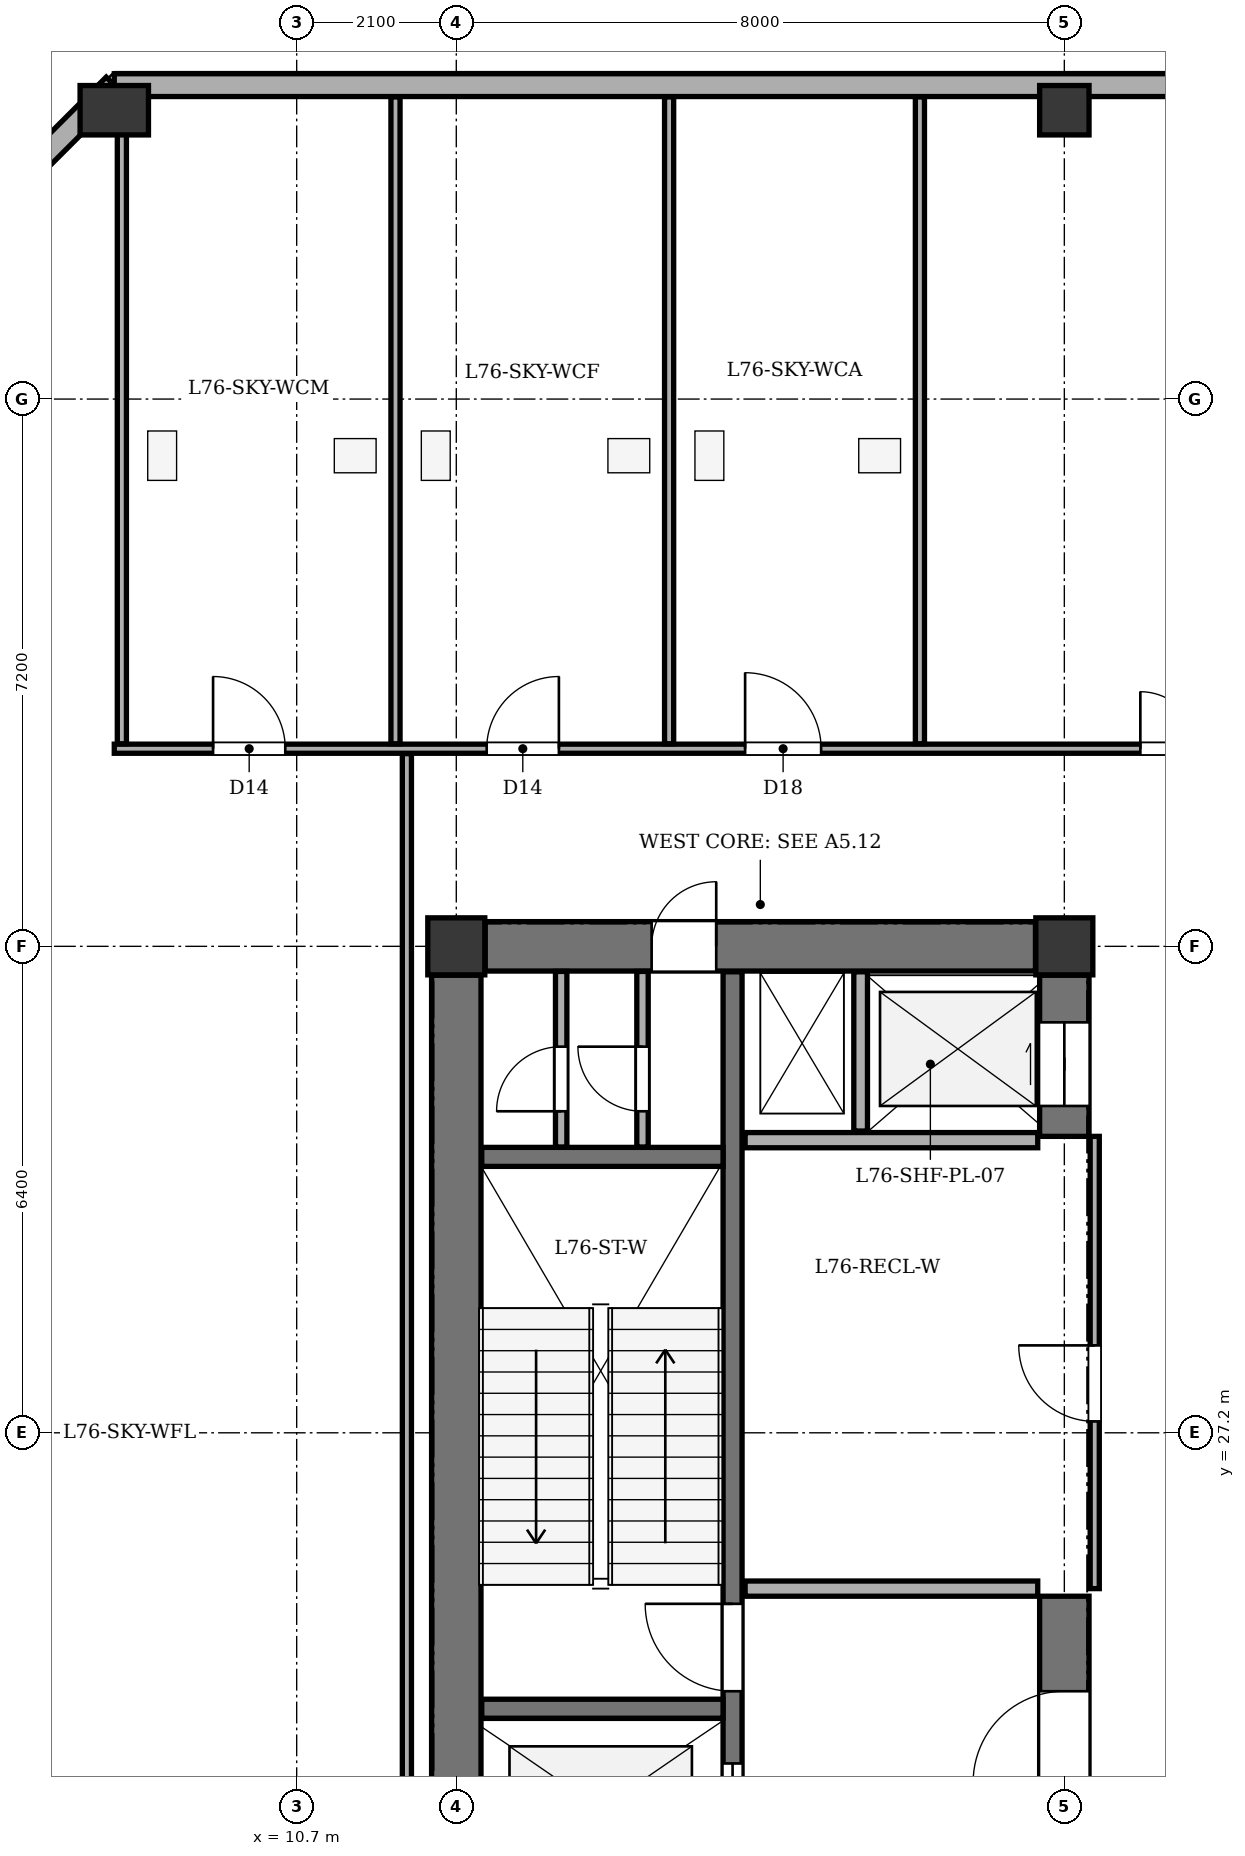
"""IFC4 building model, lengths in metres.
Left out: names, types, materials, properties, quantities, classifications, styles, units other than length and angle.
Written with IfcOpenShell. Run it as: python <this file> out.ifc"""

import sys

from ifc_helpers import new_model, si_unit, direction, frame, frame_2d, origin, origin_2d, place, context, subcontext, project, spatial, rectangle, extrude, element, fill, save


model = new_model("IFC4")
c1 = context("Model", 3, precision=1e-05, world=origin(), true_north=direction((0.0, 1.0)))
c2 = subcontext(c1, "Body", "Model", "MODEL_VIEW")
j1 = project(units=[si_unit("LENGTHUNIT", "METRE"), si_unit("PLANEANGLEUNIT", "RADIAN")], contexts=[c1])
p1 = place(None, origin())
s1 = spatial("IfcSite", under=j1, at=p1, CompositionType="ELEMENT")
p2 = place(p1, origin())
s2 = spatial("IfcBuilding", under=s1, at=p2, CompositionType="ELEMENT")
p3 = place(p2, frame((0.0, 0.0, 287.4)))
s3 = spatial("IfcBuildingStorey", under=s2, at=p3, CompositionType="ELEMENT", Elevation=287.4)
for number, where, z_axis, x_axis in (
    (1, (12.8, 33.6, 0.0), (0.0, 0.0, 1.0), (1.0, 0.0, 0.0)),
    (2, (20.8, 33.6, 0.0), (0.0, 0.0, 1.0), (1.0, 0.0, 0.0)),
):
    element("IfcColumn", number, at=place(p3, frame(where, z_axis=z_axis, x_axis=x_axis)), inside=s3, PredefinedType="COLUMN", context=c2, shape_type="SweptSolid", body=[
        extrude(rectangle(XDim=0.75, YDim=0.75, at=origin_2d()), origin(), (0.0, 0.0, 1.0), 4.8),
    ])
p4 = place(p3, frame((8.3, 44.6, 0.0), z_axis=(0.0, 0.0, 1.0), x_axis=(1.0, 0.0, 0.0)))
e3 = element("IfcColumn", 3, at=p4, inside=s3, PredefinedType="COLUMN", context=c2, shape_type="SweptSolid", body=[
    extrude(rectangle(XDim=0.65, YDim=0.9, at=origin_2d()), origin(), (0.0, 0.0, 1.0), 4.8),
])
p5 = place(p3, frame((20.8, 44.6, 0.0), z_axis=(0.0, 0.0, 1.0), x_axis=(1.0, 0.0, 0.0)))
e4 = element("IfcColumn", 4, at=p5, inside=s3, PredefinedType="COLUMN", context=c2, shape_type="SweptSolid", body=[
    extrude(rectangle(XDim=0.65, YDim=0.65, at=origin_2d()), origin(), (0.0, 0.0, 1.0), 4.8),
])
p6 = place(p3, frame((4.47, 41.1, 0.0), z_axis=(0.0, 0.0, 1.0), x_axis=(0.707129318095, 0.707084243559, 0.0)))
e5 = element("IfcWall", 5, at=p6, inside=s3, PredefinedType="STANDARD", context=c2, shape_type="SweptSolid", body=[
    extrude(rectangle(XDim=5.416, YDim=0.3, at=frame_2d((2.708, 0.0))), origin(), (0.0, 0.0, 1.0), 3.735),
])
p7 = place(p3, frame((8.3, 44.93, 0.0), z_axis=(0.0, 0.0, 1.0), x_axis=(1.0, 0.0, 0.0)))
e6 = element("IfcWall", 6, at=p7, inside=s3, PredefinedType="STANDARD", context=c2, shape_type="SweptSolid", body=[
    extrude(rectangle(XDim=37.0, YDim=0.3, at=frame_2d((18.5, 0.0))), origin(), (0.0, 0.0, 1.0), 3.735),
])
p8 = place(p3, frame((12.8, 21.18, 0.0), z_axis=(0.0, 0.0, 1.0), x_axis=(0.0, 1.0, 0.0)))
e7 = element("IfcWall", 7, at=p8, inside=s3, PredefinedType="SHEAR", context=c2, shape_type="SweptSolid", body=[
    extrude(rectangle(XDim=12.04, YDim=0.65, at=frame_2d((6.02, 0.0))), origin(), (0.0, 0.0, 1.0), 4.35),
])
p9 = place(p3, frame((13.18, 33.6, 0.0), z_axis=(0.0, 0.0, 1.0), x_axis=(1.0, 0.0, 0.0)))
e8 = element("IfcWall", 8, at=p9, inside=s3, PredefinedType="SHEAR", context=c2, shape_type="SweptSolid", body=[
    extrude(rectangle(XDim=7.24, YDim=0.65, at=frame_2d((3.62, 0.0))), origin(), (0.0, 0.0, 1.0), 4.35),
])
p10 = place(p9, frame((2.19, 0.0, 0.0)))
e9 = element("IfcOpeningElement", 9, at=p10, cuts=e8, PredefinedType="OPENING", context=c2, shape_type="SweptSolid", body=[
    extrude(rectangle(XDim=0.85, YDim=2.02, at=frame_2d((0.425, 1.01))), frame((0.0, 0.335, 0.0), z_axis=(0.0, -1.0, 0.0), x_axis=(1.0, 0.0, 0.0)), (0.0, 0.0, 1.0), 0.67),
])
p11 = place(p3, frame((20.8, 21.18, 0.0), z_axis=(0.0, 0.0, 1.0), x_axis=(0.0, 1.0, 0.0)))
e10 = element("IfcWall", 10, at=p11, inside=s3, PredefinedType="SHEAR", context=c2, shape_type="SweptSolid", body=[
    extrude(rectangle(XDim=3.87, YDim=0.65, at=frame_2d((1.935, 0.0))), origin(), (0.0, 0.0, 1.0), 4.35),
])
p12 = place(p11, frame((1.42, 0.0, 0.0)))
e11 = element("IfcOpeningElement", 11, at=p12, cuts=e10, PredefinedType="OPENING", context=c2, shape_type="SweptSolid", body=[
    extrude(rectangle(XDim=1.2, YDim=2.15, at=frame_2d((0.6, 1.075))), frame((0.0, 0.335, 0.0), z_axis=(0.0, -1.0, 0.0), x_axis=(1.0, 0.0, 0.0)), (0.0, 0.0, 1.0), 0.67),
])
p13 = place(p3, frame((20.8, 31.1, 0.0), z_axis=(0.0, 0.0, 1.0), x_axis=(0.0, 1.0, 0.0)))
e12 = element("IfcWall", 12, at=p13, inside=s3, PredefinedType="SHEAR", context=c2, shape_type="SweptSolid", body=[
    extrude(rectangle(XDim=2.12, YDim=0.65, at=frame_2d((1.06, 0.0))), origin(), (0.0, 0.0, 1.0), 4.35),
])
p14 = place(p13, frame((0.4, 0.0, 0.0)))
e13 = element("IfcOpeningElement", 13, at=p14, cuts=e12, PredefinedType="OPENING", context=c2, shape_type="SweptSolid", body=[
    extrude(rectangle(XDim=1.1, YDim=2.1, at=frame_2d((0.55, 1.05))), frame((0.0, 0.335, 0.0), z_axis=(0.0, -1.0, 0.0), x_axis=(1.0, 0.0, 0.0)), (0.0, 0.0, 1.0), 0.67),
])
p15 = place(p3, frame((16.435, 21.135, 0.0), z_axis=(0.0, 0.0, 1.0), x_axis=(0.0, 1.0, 0.0)))
e14 = element("IfcWall", 14, at=p15, inside=s3, PredefinedType="SHEAR", context=c2, shape_type="SweptSolid", body=[
    extrude(rectangle(XDim=12.13, YDim=0.25, at=frame_2d((6.065, 0.0))), origin(), (0.0, 0.0, 1.0), 4.35),
])
p16 = place(p15, frame((0.515, 0.0, 0.0)))
e15 = element("IfcOpeningElement", 15, at=p16, cuts=e14, PredefinedType="OPENING", context=c2, shape_type="SweptSolid", body=[
    extrude(rectangle(XDim=1.2, YDim=2.15, at=frame_2d((0.6, 1.075))), frame((0.0, 0.135, 0.0), z_axis=(0.0, -1.0, 0.0), x_axis=(1.0, 0.0, 0.0)), (0.0, 0.0, 1.0), 0.27),
])
p17 = place(p15, frame((2.665, 0.0, 0.0)))
e16 = element("IfcOpeningElement", 16, at=p17, cuts=e14, PredefinedType="OPENING", context=c2, shape_type="SweptSolid", body=[
    extrude(rectangle(XDim=1.15, YDim=2.15, at=frame_2d((0.575, 1.075))), frame((0.0, 0.135, 0.0), z_axis=(0.0, -1.0, 0.0), x_axis=(1.0, 0.0, 0.0)), (0.0, 0.0, 1.0), 0.27),
])
for number, where, z_axis, x_axis in (
    (17, (13.135, 23.57, 0.0), (0.0, 0.0, 1.0), (1.0, 0.0, 0.0)),
    (18, (13.135, 30.83, 0.0), (0.0, 0.0, 1.0), (1.0, 0.0, 0.0)),
):
    element("IfcWall", number, at=place(p3, frame(where, z_axis=z_axis, x_axis=x_axis)), inside=s3, PredefinedType="SHEAR", context=c2, shape_type="SweptSolid", body=[
        extrude(rectangle(XDim=3.175, YDim=0.25, at=frame_2d((1.587, 0.0))), origin(), (0.0, 0.0, 1.0), 4.35),
    ])
for number, where, z_axis, x_axis in (
    (19, (16.6, 25.15, 0.0), (0.0, 0.0, 1.0), (1.0, 0.0, 0.0)),
    (20, (16.6, 31.05, 0.0), (0.0, 0.0, 1.0), (1.0, 0.0, 0.0)),
):
    element("IfcWall", number, at=place(p3, frame(where, z_axis=z_axis, x_axis=x_axis)), inside=s3, PredefinedType="SOLIDWALL", context=c2, shape_type="SweptSolid", body=[
        extrude(rectangle(XDim=3.85, YDim=0.2, at=frame_2d((1.925, 0.0))), origin(), (0.0, 0.0, 1.0), 4.35),
    ])
p18 = place(p3, frame((18.12, 31.17, 0.0), z_axis=(0.0, 0.0, 1.0), x_axis=(0.0, 1.0, 0.0)))
e21 = element("IfcWall", 21, at=p18, inside=s3, PredefinedType="PARTITIONING", context=c2, shape_type="SweptSolid", body=[
    extrude(rectangle(XDim=2.095, YDim=0.18, at=frame_2d((1.047, 0.0))), origin(), (0.0, 0.0, 1.0), 4.35),
])
p19 = place(p3, frame((14.18, 30.96, 0.0), z_axis=(0.0, 0.0, 1.0), x_axis=(0.0, 1.0, 0.0)))
e22 = element("IfcWall", 22, at=p19, inside=s3, PredefinedType="PARTITIONING", context=c2, shape_type="SweptSolid", body=[
    extrude(rectangle(XDim=2.31, YDim=0.15, at=frame_2d((1.155, 0.0))), origin(), (0.0, 0.0, 1.0), 4.35),
])
p20 = place(p19, frame((0.47, 0.0, 0.0)))
e23 = element("IfcOpeningElement", 23, at=p20, cuts=e22, PredefinedType="OPENING", context=c2, shape_type="SweptSolid", body=[
    extrude(rectangle(XDim=0.85, YDim=2.02, at=frame_2d((0.425, 1.01))), frame((0.0, 0.085, 0.0), z_axis=(0.0, -1.0, 0.0), x_axis=(1.0, 0.0, 0.0)), (0.0, 0.0, 1.0), 0.17),
])
p21 = place(p3, frame((15.25, 30.96, 0.0), z_axis=(0.0, 0.0, 1.0), x_axis=(0.0, 1.0, 0.0)))
e24 = element("IfcWall", 24, at=p21, inside=s3, PredefinedType="PARTITIONING", context=c2, shape_type="SweptSolid", body=[
    extrude(rectangle(XDim=2.31, YDim=0.15, at=frame_2d((1.155, 0.0))), origin(), (0.0, 0.0, 1.0), 4.35),
])
p22 = place(p21, frame((0.47, 0.0, 0.0)))
e25 = element("IfcOpeningElement", 25, at=p22, cuts=e24, PredefinedType="OPENING", context=c2, shape_type="SweptSolid", body=[
    extrude(rectangle(XDim=0.85, YDim=2.02, at=frame_2d((0.425, 1.01))), frame((0.0, 0.085, 0.0), z_axis=(0.0, -1.0, 0.0), x_axis=(1.0, 0.0, 0.0)), (0.0, 0.0, 1.0), 0.17),
])
p23 = place(p3, frame((21.2, 25.15, 0.0), z_axis=(0.0, 0.0, 1.0), x_axis=(0.0, 1.0, 0.0)))
e26 = element("IfcWall", 26, at=p23, inside=s3, PredefinedType="PARTITIONING", context=c2, shape_type="SweptSolid", body=[
    extrude(rectangle(XDim=5.95, YDim=0.12, at=frame_2d((2.975, 0.0))), origin(), (0.0, 0.0, 1.0), 4.35),
])
p24 = place(p23, frame((2.2, 0.0, 0.0)))
e27 = element("IfcOpeningElement", 27, at=p24, cuts=e26, PredefinedType="OPENING", context=c2, shape_type="SweptSolid", body=[
    extrude(rectangle(XDim=1.0, YDim=2.1, at=frame_2d((0.5, 1.05))), frame((0.0, 0.07, 0.0), z_axis=(0.0, -1.0, 0.0), x_axis=(1.0, 0.0, 0.0)), (0.0, 0.0, 1.0), 0.14),
])
p25 = place(p3, frame((8.3, 36.2, 0.0), z_axis=(0.0, 0.0, 1.0), x_axis=(1.0, 0.0, 0.0)))
e28 = element("IfcWall", 28, at=p25, inside=s3, PredefinedType="PARTITIONING", context=c2, shape_type="SweptSolid", body=[
    extrude(rectangle(XDim=37.0, YDim=0.12, at=frame_2d((18.5, 0.0))), origin(), (0.0, 0.0, 1.0), 4.35),
])
p26 = place(p25, frame((1.3, 0.0, 0.0)))
e29 = element("IfcOpeningElement", 29, at=p26, cuts=e28, PredefinedType="OPENING", context=c2, shape_type="SweptSolid", body=[
    extrude(rectangle(XDim=0.95, YDim=2.1, at=frame_2d((0.475, 1.05))), frame((0.0, 0.07, 0.0), z_axis=(0.0, -1.0, 0.0), x_axis=(1.0, 0.0, 0.0)), (0.0, 0.0, 1.0), 0.14),
])
p27 = place(p25, frame((4.9, 0.0, 0.0)))
e30 = element("IfcOpeningElement", 30, at=p27, cuts=e28, PredefinedType="OPENING", context=c2, shape_type="SweptSolid", body=[
    extrude(rectangle(XDim=0.95, YDim=2.1, at=frame_2d((0.475, 1.05))), frame((0.0, 0.07, 0.0), z_axis=(0.0, -1.0, 0.0), x_axis=(1.0, 0.0, 0.0)), (0.0, 0.0, 1.0), 0.14),
])
p28 = place(p25, frame((8.3, 0.0, 0.0)))
e31 = element("IfcOpeningElement", 31, at=p28, cuts=e28, PredefinedType="OPENING", context=c2, shape_type="SweptSolid", body=[
    extrude(rectangle(XDim=1.0, YDim=2.1, at=frame_2d((0.5, 1.05))), frame((0.0, 0.07, 0.0), z_axis=(0.0, -1.0, 0.0), x_axis=(1.0, 0.0, 0.0)), (0.0, 0.0, 1.0), 0.14),
])
p29 = place(p25, frame((13.5, 0.0, 0.0)))
e32 = element("IfcOpeningElement", 32, at=p29, cuts=e28, PredefinedType="OPENING", context=c2, shape_type="SweptSolid", body=[
    extrude(rectangle(XDim=1.5, YDim=2.15, at=frame_2d((0.75, 1.075))), frame((0.0, 0.07, 0.0), z_axis=(0.0, -1.0, 0.0), x_axis=(1.0, 0.0, 0.0)), (0.0, 0.0, 1.0), 0.14),
])
for number, where, z_axis, x_axis in (
    (33, (8.4, 36.265, 0.0), (0.0, 0.0, 1.0), (0.0, 1.0, 0.0)),
    (34, (12.0, 36.265, 0.0), (0.0, 0.0, 1.0), (0.0, 1.0, 0.0)),
    (35, (15.6, 36.265, 0.0), (0.0, 0.0, 1.0), (0.0, 1.0, 0.0)),
    (36, (18.9, 36.265, 0.0), (0.0, 0.0, 1.0), (0.0, 1.0, 0.0)),
):
    element("IfcWall", number, at=place(p3, frame(where, z_axis=z_axis, x_axis=x_axis)), inside=s3, PredefinedType="PARTITIONING", context=c2, shape_type="SweptSolid", body=[
        extrude(rectangle(XDim=8.51, YDim=0.12, at=frame_2d((4.255, 0.0))), origin(), (0.0, 0.0, 1.0), 4.35),
    ])
p30 = place(p3, frame((12.15, 18.665, 0.0), z_axis=(0.0, 0.0, 1.0), x_axis=(0.0, 1.0, 0.0)))
e37 = element("IfcWall", 37, at=p30, inside=s3, PredefinedType="PARTITIONING", context=c2, shape_type="SweptSolid", body=[
    extrude(rectangle(XDim=17.47, YDim=0.12, at=frame_2d((8.735, 0.0))), origin(), (0.0, 0.0, 1.0), 4.35),
])
p31 = place(p30, frame((0.385, 0.0, 0.0)))
e38 = element("IfcOpeningElement", 38, at=p31, cuts=e37, PredefinedType="OPENING", context=c2, shape_type="SweptSolid", body=[
    extrude(rectangle(XDim=1.1, YDim=2.15, at=frame_2d((0.55, 1.075))), frame((0.0, 0.07, 0.0), z_axis=(0.0, -1.0, 0.0), x_axis=(1.0, 0.0, 0.0)), (0.0, 0.0, 1.0), 0.14),
])
p32 = place(p10, origin())
e39 = element("IfcDoor", 39, at=p32, inside=s3, OperationType="SINGLE_SWING_RIGHT", PredefinedType="DOOR", context=c2, shape_type="SweptSolid", body=[
    extrude(rectangle(XDim=0.85, YDim=2.02, at=frame_2d((0.425, 1.01))), frame((0.0, 0.025, 0.0), z_axis=(0.0, -1.0, 0.0), x_axis=(1.0, 0.0, 0.0)), (0.0, 0.0, 1.0), 0.05),
])
fill(e9, e39)
p33 = place(p12, origin())
e40 = element("IfcDoor", 40, at=p33, inside=s3, OperationType="SINGLE_SWING_LEFT", PredefinedType="DOOR", context=c2, shape_type="SweptSolid", body=[
    extrude(rectangle(XDim=1.2, YDim=2.15, at=frame_2d((0.6, 1.075))), frame((0.0, 0.025, 0.0), z_axis=(0.0, -1.0, 0.0), x_axis=(1.0, 0.0, 0.0)), (0.0, 0.0, 1.0), 0.05),
])
fill(e11, e40)
p34 = place(p14, origin())
e41 = element("IfcDoor", 41, at=p34, inside=s3, OperationType="DOUBLE_DOOR_SLIDING", PredefinedType="DOOR", context=c2, shape_type="SweptSolid", body=[
    extrude(rectangle(XDim=1.1, YDim=2.1, at=frame_2d((0.55, 1.05))), frame((0.0, 0.025, 0.0), z_axis=(0.0, -1.0, 0.0), x_axis=(1.0, 0.0, 0.0)), (0.0, 0.0, 1.0), 0.05),
])
fill(e13, e41)
p35 = place(p16, origin())
e42 = element("IfcDoor", 42, at=p35, inside=s3, OperationType="DOUBLE_DOOR_SLIDING", PredefinedType="DOOR", context=c2, shape_type="SweptSolid", body=[
    extrude(rectangle(XDim=1.2, YDim=2.15, at=frame_2d((0.6, 1.075))), frame((0.0, 0.025, 0.0), z_axis=(0.0, -1.0, 0.0), x_axis=(1.0, 0.0, 0.0)), (0.0, 0.0, 1.0), 0.05),
])
fill(e15, e42)
p36 = place(p17, origin())
e43 = element("IfcDoor", 43, at=p36, inside=s3, OperationType="SINGLE_SWING_RIGHT", PredefinedType="DOOR", context=c2, shape_type="SweptSolid", body=[
    extrude(rectangle(XDim=1.15, YDim=2.15, at=frame_2d((0.575, 1.075))), frame((0.0, 0.025, 0.0), z_axis=(0.0, -1.0, 0.0), x_axis=(1.0, 0.0, 0.0)), (0.0, 0.0, 1.0), 0.05),
])
fill(e16, e43)
p37 = place(p20, origin())
e44 = element("IfcDoor", 44, at=p37, inside=s3, OperationType="SINGLE_SWING_LEFT", PredefinedType="DOOR", context=c2, shape_type="SweptSolid", body=[
    extrude(rectangle(XDim=0.85, YDim=2.02, at=frame_2d((0.425, 1.01))), frame((0.0, 0.025, 0.0), z_axis=(0.0, -1.0, 0.0), x_axis=(1.0, 0.0, 0.0)), (0.0, 0.0, 1.0), 0.05),
])
fill(e23, e44)
p38 = place(p22, origin())
e45 = element("IfcDoor", 45, at=p38, inside=s3, OperationType="SINGLE_SWING_RIGHT", PredefinedType="DOOR", context=c2, shape_type="SweptSolid", body=[
    extrude(rectangle(XDim=0.85, YDim=2.02, at=frame_2d((0.425, 1.01))), frame((0.0, 0.025, 0.0), z_axis=(0.0, -1.0, 0.0), x_axis=(1.0, 0.0, 0.0)), (0.0, 0.0, 1.0), 0.05),
])
fill(e25, e45)
p39 = place(p24, origin())
e46 = element("IfcDoor", 46, at=p39, inside=s3, OperationType="SINGLE_SWING_RIGHT", PredefinedType="DOOR", context=c2, shape_type="SweptSolid", body=[
    extrude(rectangle(XDim=1.0, YDim=2.1, at=frame_2d((0.5, 1.05))), frame((0.0, 0.025, 0.0), z_axis=(0.0, -1.0, 0.0), x_axis=(1.0, 0.0, 0.0)), (0.0, 0.0, 1.0), 0.05),
])
fill(e27, e46)
p40 = place(p26, origin())
e47 = element("IfcDoor", 47, at=p40, inside=s3, OperationType="SINGLE_SWING_LEFT", PredefinedType="DOOR", context=c2, shape_type="SweptSolid", body=[
    extrude(rectangle(XDim=0.95, YDim=2.1, at=frame_2d((0.475, 1.05))), frame((0.0, 0.025, 0.0), z_axis=(0.0, -1.0, 0.0), x_axis=(1.0, 0.0, 0.0)), (0.0, 0.0, 1.0), 0.05),
])
fill(e29, e47)
p41 = place(p27, origin())
e48 = element("IfcDoor", 48, at=p41, inside=s3, OperationType="SINGLE_SWING_RIGHT", PredefinedType="DOOR", context=c2, shape_type="SweptSolid", body=[
    extrude(rectangle(XDim=0.95, YDim=2.1, at=frame_2d((0.475, 1.05))), frame((0.0, 0.025, 0.0), z_axis=(0.0, -1.0, 0.0), x_axis=(1.0, 0.0, 0.0)), (0.0, 0.0, 1.0), 0.05),
])
fill(e30, e48)
p42 = place(p28, origin())
e49 = element("IfcDoor", 49, at=p42, inside=s3, OperationType="SINGLE_SWING_LEFT", PredefinedType="DOOR", context=c2, shape_type="SweptSolid", body=[
    extrude(rectangle(XDim=1.0, YDim=2.1, at=frame_2d((0.5, 1.05))), frame((0.0, 0.025, 0.0), z_axis=(0.0, -1.0, 0.0), x_axis=(1.0, 0.0, 0.0)), (0.0, 0.0, 1.0), 0.05),
])
fill(e31, e49)
p43 = place(p29, origin())
e50 = element("IfcDoor", 50, at=p43, inside=s3, OperationType="DOUBLE_DOOR_SINGLE_SWING", PredefinedType="DOOR", context=c2, shape_type="SweptSolid", body=[
    extrude(rectangle(XDim=1.5, YDim=2.15, at=frame_2d((0.75, 1.075))), frame((0.0, 0.025, 0.0), z_axis=(0.0, -1.0, 0.0), x_axis=(1.0, 0.0, 0.0)), (0.0, 0.0, 1.0), 0.05),
])
fill(e32, e50)
save(model, sys.argv[1])
